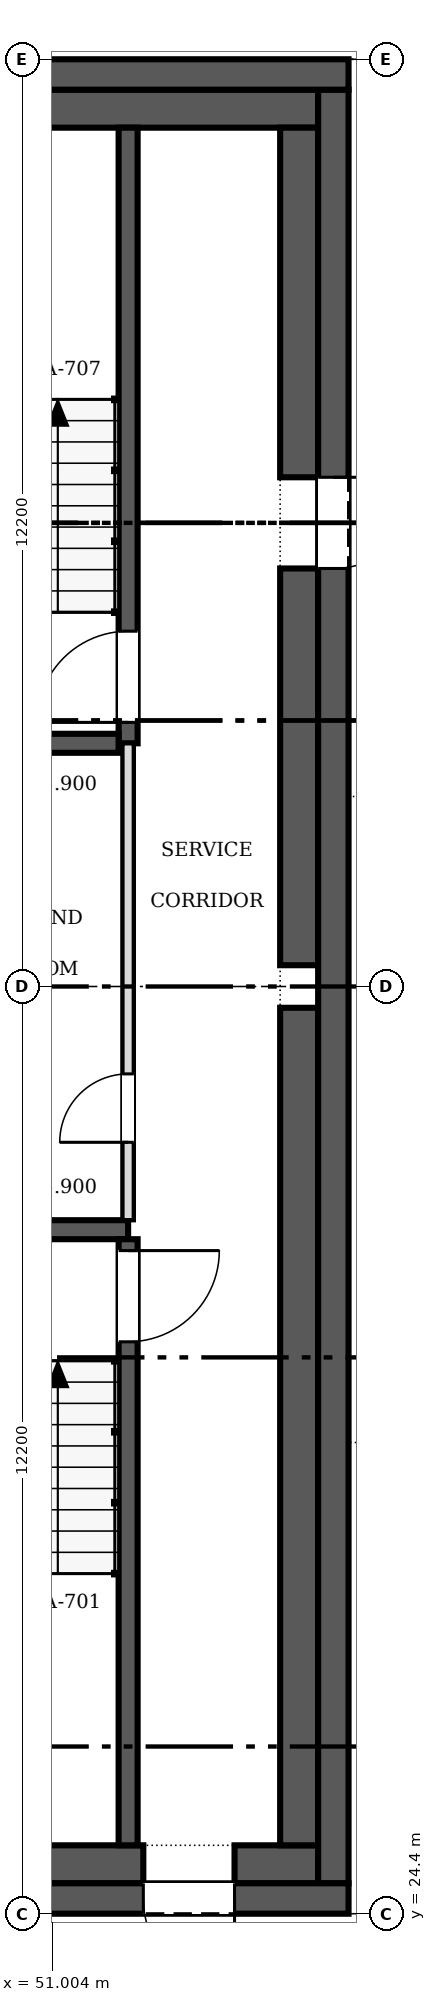
"""IFC4 building model, lengths in metres.
Left out: names, types, materials, properties, quantities, classifications, styles, units other than length and angle.
Written with IfcOpenShell. Run it as: python <this file> out.ifc"""

import sys

from ifc_helpers import new_model, si_unit, direction, frame, frame_2d, origin, place, context, subcontext, project, spatial, rectangle, extrude, source, transform, mapped, element, fill, save


model = new_model("IFC4")
c1 = context("Model", 3, precision=1e-05, world=origin(), true_north=direction((0.0, 1.0)))
c2 = subcontext(c1, "Body", "Model", "MODEL_VIEW")
j1 = project(units=[si_unit("LENGTHUNIT", "METRE"), si_unit("PLANEANGLEUNIT", "RADIAN")], contexts=[c1])
p1 = place(None, origin())
s1 = spatial("IfcSite", under=j1, at=p1, CompositionType="ELEMENT")
p2 = place(p1, origin())
s2 = spatial("IfcBuilding", under=s1, at=p2, CompositionType="ELEMENT")
p3 = place(p2, frame((0.0, 0.0, 255.9)))
s3 = spatial("IfcBuildingStorey", under=s2, at=p3, CompositionType="ELEMENT", Elevation=255.9)
p4 = place(p3, frame((54.9, 24.6, 0.0), z_axis=(0.0, 0.0, 1.0), x_axis=(-1.0, 0.0, 0.0)))
e1 = element("IfcWall", 1, at=p4, inside=s3, PredefinedType="SHEAR", context=c2, shape_type="SweptSolid", body=[
    extrude(rectangle(XDim=24.4, YDim=0.4, at=frame_2d((12.2, 0.0))), origin(), (0.0, 0.0, 1.0), 3.8),
])
m1 = source(origin(), c2, "Body", "SweptSolid", [
    extrude(rectangle(XDim=1.2, YDim=2.1, at=frame_2d((0.6, 1.05))), frame((0.0, 0.21, 0.0), z_axis=(0.0, -1.0, 0.0), x_axis=(1.0, 0.0, 0.0)), (0.0, 0.0, 1.0), 0.42),
])
p5 = place(p4, frame((1.5, 0.0, 0.0)))
e2 = element("IfcOpeningElement", 2, at=p5, cuts=e1, PredefinedType="OPENING", context=c2, shape_type="MappedRepresentation", body=[
    mapped(m1, transform((0.0, 0.0, 0.0), scale=1.0)),
])
p6 = place(p3, frame((30.5, 48.6, 0.0), z_axis=(0.0, 0.0, 1.0), x_axis=(1.0, 0.0, 0.0)))
e3 = element("IfcWall", 3, at=p6, inside=s3, PredefinedType="SHEAR", context=c2, shape_type="SweptSolid", body=[
    extrude(rectangle(XDim=24.4, YDim=0.4, at=frame_2d((12.2, 0.0))), origin(), (0.0, 0.0, 1.0), 3.8),
])
p7 = place(p3, frame((54.7, 48.4, 0.0), z_axis=(0.0, 0.0, 1.0), x_axis=(0.0, -1.0, 0.0)))
e4 = element("IfcWall", 4, at=p7, inside=s3, PredefinedType="SHEAR", context=c2, shape_type="SweptSolid", body=[
    extrude(rectangle(XDim=23.6, YDim=0.4, at=frame_2d((11.8, 0.0))), origin(), (0.0, 0.0, 1.0), 3.8),
])
p8 = place(p7, frame((5.1, 0.0, 0.0)))
e5 = element("IfcOpeningElement", 5, at=p8, cuts=e4, PredefinedType="OPENING", context=c2, shape_type="MappedRepresentation", body=[
    mapped(m1, transform((0.0, 0.0, 0.0), scale=1.0)),
])
p9 = place(p3, frame((30.9, 25.05, 0.0), z_axis=(0.0, 0.0, 1.0), x_axis=(1.0, 0.0, 0.0)))
e6 = element("IfcWall", 6, at=p9, inside=s3, PredefinedType="SOLIDWALL", context=c2, shape_type="SweptSolid", body=[
    extrude(rectangle(XDim=21.3, YDim=0.5, at=frame_2d((10.65, 0.0))), origin(), (0.0, 0.0, 1.0), 3.8),
])
p10 = place(p3, frame((53.4, 25.05, 0.0), z_axis=(0.0, 0.0, 1.0), x_axis=(1.0, 0.0, 0.0)))
e7 = element("IfcWall", 7, at=p10, inside=s3, PredefinedType="SOLIDWALL", context=c2, shape_type="SweptSolid", body=[
    extrude(rectangle(XDim=1.1, YDim=0.5, at=frame_2d((0.55, 0.0))), origin(), (0.0, 0.0, 1.0), 3.8),
])
p11 = place(p3, frame((30.9, 48.15, 0.0), z_axis=(0.0, 0.0, 1.0), x_axis=(1.0, 0.0, 0.0)))
e8 = element("IfcWall", 8, at=p11, inside=s3, PredefinedType="SOLIDWALL", context=c2, shape_type="SweptSolid", body=[
    extrude(rectangle(XDim=23.6, YDim=0.5, at=frame_2d((11.8, 0.0))), origin(), (0.0, 0.0, 1.0), 3.8),
])
p12 = place(p3, frame((54.25, 25.3, 0.0), z_axis=(0.0, 0.0, 1.0), x_axis=(0.0, 1.0, 0.0)))
e9 = element("IfcWall", 9, at=p12, inside=s3, PredefinedType="SOLIDWALL", context=c2, shape_type="SweptSolid", body=[
    extrude(rectangle(XDim=11.02, YDim=0.5, at=frame_2d((5.51, 0.0))), origin(), (0.0, 0.0, 1.0), 3.8),
])
p13 = place(p3, frame((54.25, 36.88, 0.0), z_axis=(0.0, 0.0, 1.0), x_axis=(0.0, 1.0, 0.0)))
e10 = element("IfcWall", 10, at=p13, inside=s3, PredefinedType="SOLIDWALL", context=c2, shape_type="SweptSolid", body=[
    extrude(rectangle(XDim=5.22, YDim=0.5, at=frame_2d((2.61, 0.0))), origin(), (0.0, 0.0, 1.0), 3.8),
])
p14 = place(p3, frame((54.25, 43.3, 0.0), z_axis=(0.0, 0.0, 1.0), x_axis=(0.0, 1.0, 0.0)))
e11 = element("IfcWall", 11, at=p14, inside=s3, PredefinedType="SOLIDWALL", context=c2, shape_type="SweptSolid", body=[
    extrude(rectangle(XDim=4.6, YDim=0.5, at=frame_2d((2.3, 0.0))), origin(), (0.0, 0.0, 1.0), 3.8),
])
p15 = place(p3, frame((48.475, 33.4, 0.0), z_axis=(0.0, 0.0, 1.0), x_axis=(1.0, 0.0, 0.0)))
e12 = element("IfcWall", 12, at=p15, inside=s3, PredefinedType="SOLIDWALL", context=c2, shape_type="SweptSolid", body=[
    extrude(rectangle(XDim=3.525, YDim=0.25, at=frame_2d((1.762, 0.0))), origin(), (0.0, 0.0, 1.0), 3.8),
])
p16 = place(p3, frame((52.0, 25.3, 0.0), z_axis=(0.0, 0.0, 1.0), x_axis=(0.0, 1.0, 0.0)))
e13 = element("IfcWall", 13, at=p16, inside=s3, PredefinedType="SOLIDWALL", context=c2, shape_type="SweptSolid", body=[
    extrude(rectangle(XDim=7.975, YDim=0.25, at=frame_2d((3.987, 0.0))), origin(), (0.0, 0.0, 1.0), 3.8),
])
m2 = source(origin(), c2, "Body", "SweptSolid", [
    extrude(rectangle(XDim=1.2, YDim=2.1, at=frame_2d((0.6, 1.05))), frame((0.0, 0.135, 0.0), z_axis=(0.0, -1.0, 0.0), x_axis=(1.0, 0.0, 0.0)), (0.0, 0.0, 1.0), 0.27),
])
p17 = place(p16, frame((6.625, 0.0, 0.0)))
e14 = element("IfcOpeningElement", 14, at=p17, cuts=e13, PredefinedType="OPENING", context=c2, shape_type="MappedRepresentation", body=[
    mapped(m2, transform((0.0, 0.0, 0.0), scale=1.0)),
])
p18 = place(p3, frame((52.0, 39.8, 0.0), z_axis=(0.0, 0.0, 1.0), x_axis=(0.0, 1.0, 0.0)))
e15 = element("IfcWall", 15, at=p18, inside=s3, PredefinedType="SOLIDWALL", context=c2, shape_type="SweptSolid", body=[
    extrude(rectangle(XDim=8.1, YDim=0.25, at=frame_2d((4.05, 0.0))), origin(), (0.0, 0.0, 1.0), 3.8),
])
p19 = place(p18, frame((0.275, 0.0, 0.0)))
e16 = element("IfcOpeningElement", 16, at=p19, cuts=e15, PredefinedType="OPENING", context=c2, shape_type="MappedRepresentation", body=[
    mapped(m2, transform((0.0, 0.0, 0.0), scale=1.0)),
])
p20 = place(p3, frame((48.475, 39.8, 0.0), z_axis=(0.0, 0.0, 1.0), x_axis=(1.0, 0.0, 0.0)))
e17 = element("IfcWall", 17, at=p20, inside=s3, PredefinedType="SOLIDWALL", context=c2, shape_type="SweptSolid", body=[
    extrude(rectangle(XDim=3.4, YDim=0.25, at=frame_2d((1.7, 0.0))), origin(), (0.0, 0.0, 1.0), 3.8),
])
p21 = place(p3, frame((52.0, 33.525, 0.0), z_axis=(0.0, 0.0, 1.0), x_axis=(0.0, 1.0, 0.0)))
e18 = element("IfcWall", 18, at=p21, inside=s3, PredefinedType="PARTITIONING", context=c2, shape_type="SweptSolid", body=[
    extrude(rectangle(XDim=6.275, YDim=0.15, at=frame_2d((3.138, 0.0))), origin(), (0.0, 0.0, 1.0), 3.55),
])
m3 = source(origin(), c2, "Body", "SweptSolid", [
    extrude(rectangle(XDim=0.9, YDim=2.1, at=frame_2d((0.45, 1.05))), frame((0.0, 0.085, 0.0), z_axis=(0.0, -1.0, 0.0), x_axis=(1.0, 0.0, 0.0)), (0.0, 0.0, 1.0), 0.17),
])
p22 = place(p21, frame((1.025, 0.0, 0.0)))
e19 = element("IfcOpeningElement", 19, at=p22, cuts=e18, PredefinedType="OPENING", context=c2, shape_type="MappedRepresentation", body=[
    mapped(m3, transform((0.0, 0.0, 0.0), scale=1.0)),
])
m4 = source(origin(), c2, "Body", "SweptSolid", [
    extrude(rectangle(XDim=1.2, YDim=2.1, at=frame_2d((0.6, 1.05))), frame((0.0, 0.025, 0.0), z_axis=(0.0, -1.0, 0.0), x_axis=(1.0, 0.0, 0.0)), (0.0, 0.0, 1.0), 0.05),
])
p23 = place(p5, origin())
e20 = element("IfcDoor", 20, at=p23, inside=s3, OperationType="SINGLE_SWING_LEFT", PredefinedType="DOOR", context=c2, shape_type="MappedRepresentation", body=[
    mapped(m4, transform((0.0, 0.0, 0.0), scale=1.0)),
])
fill(e2, e20)
p24 = place(p8, origin())
e21 = element("IfcDoor", 21, at=p24, inside=s3, OperationType="SINGLE_SWING_LEFT", PredefinedType="DOOR", context=c2, shape_type="MappedRepresentation", body=[
    mapped(m4, transform((0.0, 0.0, 0.0), scale=1.0)),
])
fill(e5, e21)
p25 = place(p17, origin())
e22 = element("IfcDoor", 22, at=p25, inside=s3, OperationType="SINGLE_SWING_RIGHT", PredefinedType="DOOR", context=c2, shape_type="MappedRepresentation", body=[
    mapped(m4, transform((0.0, 0.0, 0.0), scale=1.0)),
])
fill(e14, e22)
p26 = place(p19, origin())
e23 = element("IfcDoor", 23, at=p26, inside=s3, OperationType="SINGLE_SWING_LEFT", PredefinedType="DOOR", context=c2, shape_type="MappedRepresentation", body=[
    mapped(m4, transform((0.0, 0.0, 0.0), scale=1.0)),
])
fill(e16, e23)
m5 = source(origin(), c2, "Body", "SweptSolid", [
    extrude(rectangle(XDim=0.9, YDim=2.1, at=frame_2d((0.45, 1.05))), frame((0.0, 0.025, 0.0), z_axis=(0.0, -1.0, 0.0), x_axis=(1.0, 0.0, 0.0)), (0.0, 0.0, 1.0), 0.05),
])
p27 = place(p22, origin())
e24 = element("IfcDoor", 24, at=p27, inside=s3, OperationType="SINGLE_SWING_LEFT", PredefinedType="DOOR", context=c2, shape_type="MappedRepresentation", body=[
    mapped(m5, transform((0.0, 0.0, 0.0), scale=1.0)),
])
fill(e19, e24)
save(model, sys.argv[1])
